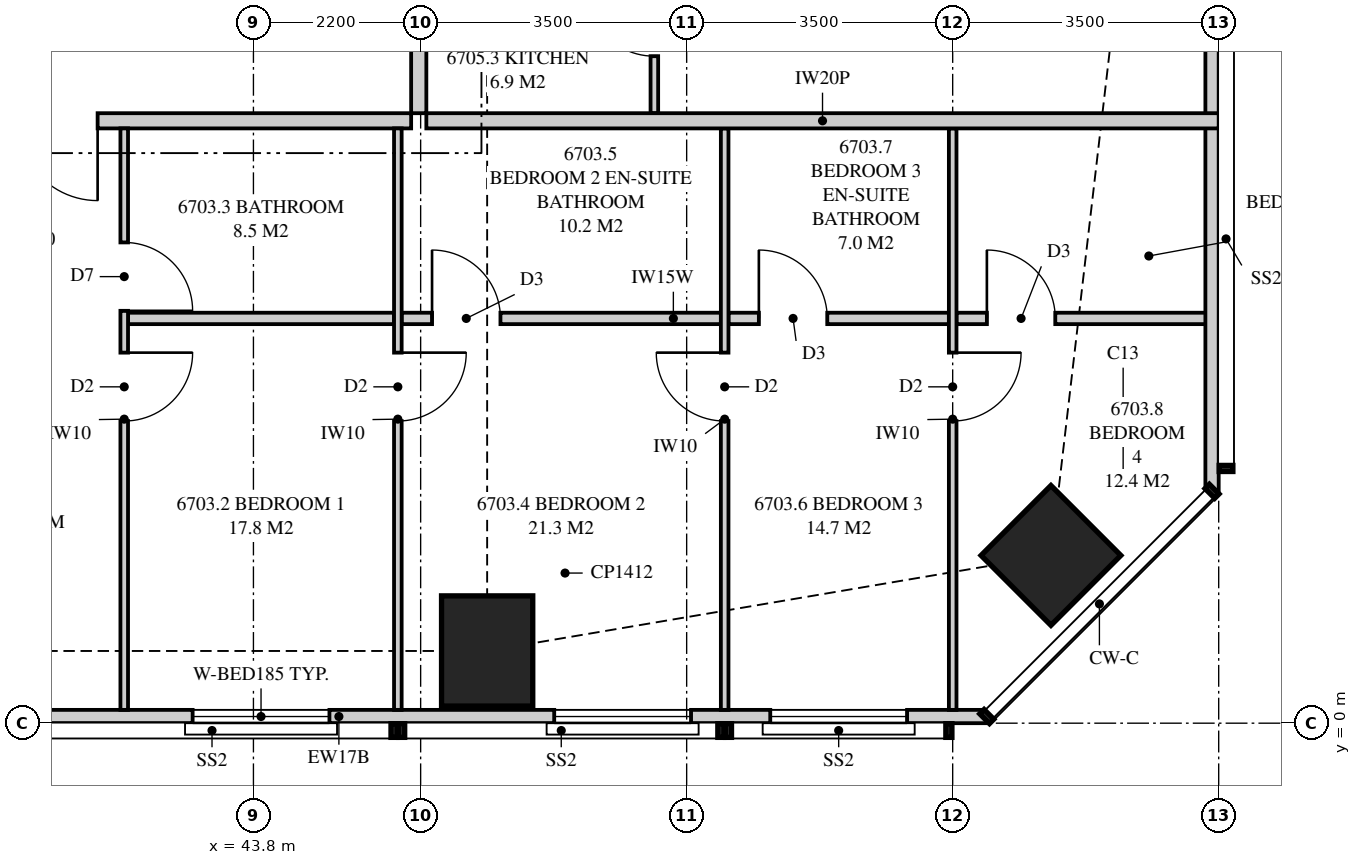
"""IFC4 building model, lengths in metres.
Left out: names, types, materials, properties, quantities, classifications, styles, units other than length and angle.
Written with IfcOpenShell. Run it as: python <this file> out.ifc"""

import sys

from ifc_helpers import new_model, si_unit, direction, frame, frame_2d, origin, origin_2d, place, context, subcontext, project, spatial, polyline, rectangle, outline, extrude, element, fill, save


model = new_model("IFC4")
c1 = context("Model", 3, precision=1e-05, world=origin(), true_north=direction((0.0, 1.0)))
c2 = subcontext(c1, "Body", "Model", "MODEL_VIEW")
j1 = project(units=[si_unit("LENGTHUNIT", "METRE"), si_unit("PLANEANGLEUNIT", "RADIAN")], contexts=[c1])
p1 = place(None, origin())
s1 = spatial("IfcSite", under=j1, at=p1, CompositionType="ELEMENT")
p2 = place(p1, origin())
s2 = spatial("IfcBuilding", under=s1, at=p2, CompositionType="ELEMENT")
p3 = place(p2, frame((0.0, 0.0, 245.95)))
s3 = spatial("IfcBuildingStorey", under=s2, at=p3, CompositionType="ELEMENT", Elevation=245.95)
p4 = place(p3, frame((46.875, 0.95, 0.0), z_axis=(0.0, 0.0, 1.0), x_axis=(0.0, 1.0, 0.0)))
e1 = element("IfcColumn", 1, at=p4, inside=s3, PredefinedType="COLUMN", context=c2, shape_type="SweptSolid", body=[
    extrude(rectangle(XDim=1.45, YDim=1.2, at=origin_2d()), origin(), (0.0, 0.0, 1.0), 3.5),
])
p5 = place(p3, frame((54.293, 2.207, 0.0), z_axis=(0.0, 0.0, 1.0), x_axis=(0.707106781187, 0.707106781187, 0.0)))
e2 = element("IfcColumn", 2, at=p5, inside=s3, PredefinedType="COLUMN", context=c2, shape_type="SweptSolid", body=[
    extrude(rectangle(XDim=1.3, YDim=1.3, at=origin_2d()), origin(), (0.0, 0.0, 1.0), 3.5),
])
p6 = place(p3, frame((36.4, 0.087, 0.0), z_axis=(0.0, 0.0, 1.0), x_axis=(1.0, 0.0, 0.0)))
e3 = element("IfcWall", 3, at=p6, inside=s3, PredefinedType="SOLIDWALL", context=c2, shape_type="SweptSolid", body=[
    extrude(outline(polyline([(0.0, 0.0), (17.049, 0.0), (17.049, 3.26), (10.69, 3.26), (10.69, 2.3), (10.606, 2.3), (10.606, 3.26), (10.475, 3.26), (10.475, 2.3), (0.0, 2.3), (0.0, 0.0)])), frame((0.0, 0.087, 0.0), z_axis=(0.0, -1.0, 0.0), x_axis=(1.0, 0.0, 0.0)), (0.0, 0.0, 1.0), 0.175),
])
p7 = place(p6, frame((1.76, 0.0, 0.4)))
e4 = element("IfcOpeningElement", 4, at=p7, cuts=e3, PredefinedType="OPENING", context=c2, shape_type="SweptSolid", body=[
    extrude(rectangle(XDim=2.4, YDim=1.85, at=frame_2d((1.2, 0.925))), frame((0.0, 0.097, 0.0), z_axis=(0.0, -1.0, 0.0), x_axis=(1.0, 0.0, 0.0)), (0.0, 0.0, 1.0), 0.195),
])
p8 = place(p6, frame((6.6, 0.0, 0.4)))
e5 = element("IfcOpeningElement", 5, at=p8, cuts=e3, PredefinedType="OPENING", context=c2, shape_type="SweptSolid", body=[
    extrude(rectangle(XDim=1.8, YDim=1.85, at=frame_2d((0.9, 0.925))), frame((0.0, 0.097, 0.0), z_axis=(0.0, -1.0, 0.0), x_axis=(1.0, 0.0, 0.0)), (0.0, 0.0, 1.0), 0.195),
])
p9 = place(p6, frame((11.357, 0.0, 0.4)))
e6 = element("IfcOpeningElement", 6, at=p9, cuts=e3, PredefinedType="OPENING", context=c2, shape_type="SweptSolid", body=[
    extrude(rectangle(XDim=1.8, YDim=1.85, at=frame_2d((0.9, 0.925))), frame((0.0, 0.097, 0.0), z_axis=(0.0, -1.0, 0.0), x_axis=(1.0, 0.0, 0.0)), (0.0, 0.0, 1.0), 0.195),
])
p10 = place(p6, frame((14.2, 0.0, 0.4)))
e7 = element("IfcOpeningElement", 7, at=p10, cuts=e3, PredefinedType="OPENING", context=c2, shape_type="SweptSolid", body=[
    extrude(rectangle(XDim=1.8, YDim=1.85, at=frame_2d((0.9, 0.925))), frame((0.0, 0.097, 0.0), z_axis=(0.0, -1.0, 0.0), x_axis=(1.0, 0.0, 0.0)), (0.0, 0.0, 1.0), 0.195),
])
p11 = place(p3, frame((56.413, 3.051, 0.0), z_axis=(0.0, 0.0, 1.0), x_axis=(0.0, 1.0, 0.0)))
e8 = element("IfcWall", 8, at=p11, inside=s3, PredefinedType="SOLIDWALL", context=c2, shape_type="SweptSolid", body=[
    extrude(outline(polyline([(0.0, 0.0), (14.749, 0.0), (14.749, 2.3), (9.949, 2.3), (9.949, 3.26), (9.858, 3.26), (9.858, 2.3), (9.688, 2.3), (9.688, 3.26), (0.0, 3.26), (0.0, 0.0)])), frame((0.0, 0.087, 0.0), z_axis=(0.0, -1.0, 0.0), x_axis=(1.0, 0.0, 0.0)), (0.0, 0.0, 1.0), 0.175),
])
p12 = place(p11, frame((6.64, 0.0, 0.4)))
e9 = element("IfcOpeningElement", 9, at=p12, cuts=e8, PredefinedType="OPENING", context=c2, shape_type="SweptSolid", body=[
    extrude(rectangle(XDim=2.4, YDim=1.85, at=frame_2d((1.2, 0.925))), frame((0.0, 0.097, 0.0), z_axis=(0.0, -1.0, 0.0), x_axis=(1.0, 0.0, 0.0)), (0.0, 0.0, 1.0), 0.195),
])
p13 = place(p11, frame((11.999, 0.0, 0.4)))
e10 = element("IfcOpeningElement", 10, at=p13, cuts=e8, PredefinedType="OPENING", context=c2, shape_type="SweptSolid", body=[
    extrude(rectangle(XDim=1.8, YDim=1.85, at=frame_2d((0.9, 0.925))), frame((0.0, 0.097, 0.0), z_axis=(0.0, -1.0, 0.0), x_axis=(1.0, 0.0, 0.0)), (0.0, 0.0, 1.0), 0.195),
])
p14 = place(p3, frame((36.55, 7.925, 0.0), z_axis=(0.0, 0.0, 1.0), x_axis=(1.0, 0.0, 0.0)))
e11 = element("IfcWall", 11, at=p14, inside=s3, PredefinedType="PARTITIONING", context=c2, shape_type="SweptSolid", body=[
    extrude(outline(polyline([(0.0, 0.0), (9.325, 0.0), (9.325, 3.26), (9.325, 2.66), (9.015, 2.66), (9.015, 3.26), (2.01, 3.26), (2.01, 2.66), (0.0, 2.66), (0.0, 3.26), (0.0, 0.0)])), frame((0.0, 0.1, 0.0), z_axis=(0.0, -1.0, 0.0), x_axis=(1.0, 0.0, 0.0)), (0.0, 0.0, 1.0), 0.2),
])
p15 = place(p14, frame((4.15, 0.0, 0.0)))
e12 = element("IfcOpeningElement", 12, at=p15, cuts=e11, PredefinedType="OPENING", context=c2, shape_type="SweptSolid", body=[
    extrude(rectangle(XDim=1.05, YDim=2.2, at=frame_2d((0.525, 1.1))), frame((0.0, 0.11, 0.0), z_axis=(0.0, -1.0, 0.0), x_axis=(1.0, 0.0, 0.0)), (0.0, 0.0, 1.0), 0.22),
])
p16 = place(p3, frame((42.1, 0.175, 0.0), z_axis=(0.0, 0.0, 1.0), x_axis=(0.0, 1.0, 0.0)))
e13 = element("IfcWall", 13, at=p16, inside=s3, PredefinedType="PARTITIONING", context=c2, shape_type="SweptSolid", body=[
    extrude(outline(polyline([(0.0, 0.0), (7.65, 0.0), (7.65, 3.26), (1.635, 3.26), (1.635, 2.3), (0.0, 2.3), (0.0, 3.26), (0.0, 0.0)])), frame((0.0, 0.05, 0.0), z_axis=(0.0, -1.0, 0.0), x_axis=(1.0, 0.0, 0.0)), (0.0, 0.0, 1.0), 0.1),
])
p17 = place(p16, frame((3.8, 0.0, 0.0)))
e14 = element("IfcOpeningElement", 14, at=p17, cuts=e13, PredefinedType="OPENING", context=c2, shape_type="SweptSolid", body=[
    extrude(rectangle(XDim=0.9, YDim=2.1, at=frame_2d((0.45, 1.05))), frame((0.0, 0.06, 0.0), z_axis=(0.0, -1.0, 0.0), x_axis=(1.0, 0.0, 0.0)), (0.0, 0.0, 1.0), 0.12),
])
p18 = place(p16, frame((5.25, 0.0, 0.0)))
e15 = element("IfcOpeningElement", 15, at=p18, cuts=e13, PredefinedType="OPENING", context=c2, shape_type="SweptSolid", body=[
    extrude(rectangle(XDim=0.9, YDim=2.1, at=frame_2d((0.45, 1.05))), frame((0.0, 0.06, 0.0), z_axis=(0.0, -1.0, 0.0), x_axis=(1.0, 0.0, 0.0)), (0.0, 0.0, 1.0), 0.12),
])
p19 = place(p3, frame((45.7, 0.175, 0.0), z_axis=(0.0, 0.0, 1.0), x_axis=(0.0, 1.0, 0.0)))
e16 = element("IfcWall", 16, at=p19, inside=s3, PredefinedType="PARTITIONING", context=c2, shape_type="SweptSolid", body=[
    extrude(outline(polyline([(0.0, 0.0), (7.65, 0.0), (7.65, 3.26), (7.65, 2.66), (1.635, 2.66), (1.635, 2.3), (0.0, 2.3), (0.0, 3.26), (0.0, 0.0)])), frame((0.0, 0.05, 0.0), z_axis=(0.0, -1.0, 0.0), x_axis=(1.0, 0.0, 0.0)), (0.0, 0.0, 1.0), 0.1),
])
p20 = place(p19, frame((3.8, 0.0, 0.0)))
e17 = element("IfcOpeningElement", 17, at=p20, cuts=e16, PredefinedType="OPENING", context=c2, shape_type="SweptSolid", body=[
    extrude(rectangle(XDim=0.9, YDim=2.1, at=frame_2d((0.45, 1.05))), frame((0.0, 0.06, 0.0), z_axis=(0.0, -1.0, 0.0), x_axis=(1.0, 0.0, 0.0)), (0.0, 0.0, 1.0), 0.12),
])
p21 = place(p3, frame((50.0, 0.175, 0.0), z_axis=(0.0, 0.0, 1.0), x_axis=(0.0, 1.0, 0.0)))
e18 = element("IfcWall", 18, at=p21, inside=s3, PredefinedType="PARTITIONING", context=c2, shape_type="SweptSolid", body=[
    extrude(outline(polyline([(0.0, 0.0), (7.65, 0.0), (7.65, 3.26), (2.177, 3.26), (2.177, 2.3), (0.432, 2.3), (0.432, 3.26), (0.0, 3.26), (0.0, 0.0)])), frame((0.0, 0.05, 0.0), z_axis=(0.0, -1.0, 0.0), x_axis=(1.0, 0.0, 0.0)), (0.0, 0.0, 1.0), 0.1),
])
p22 = place(p21, frame((3.8, 0.0, 0.0)))
e19 = element("IfcOpeningElement", 19, at=p22, cuts=e18, PredefinedType="OPENING", context=c2, shape_type="SweptSolid", body=[
    extrude(rectangle(XDim=0.9, YDim=2.1, at=frame_2d((0.45, 1.05))), frame((0.0, 0.06, 0.0), z_axis=(0.0, -1.0, 0.0), x_axis=(1.0, 0.0, 0.0)), (0.0, 0.0, 1.0), 0.12),
])
p23 = place(p3, frame((53.0, 0.175, 0.0), z_axis=(0.0, 0.0, 1.0), x_axis=(0.0, 1.0, 0.0)))
e20 = element("IfcWall", 20, at=p23, inside=s3, PredefinedType="PARTITIONING", context=c2, shape_type="SweptSolid", body=[
    extrude(outline(polyline([(0.0, 0.0), (7.65, 0.0), (7.65, 3.26), (2.685, 3.26), (2.685, 2.3), (0.941, 2.3), (0.941, 3.26), (0.0, 3.26), (0.0, 0.0)])), frame((0.0, 0.05, 0.0), z_axis=(0.0, -1.0, 0.0), x_axis=(1.0, 0.0, 0.0)), (0.0, 0.0, 1.0), 0.1),
])
p24 = place(p23, frame((3.8, 0.0, 0.0)))
e21 = element("IfcOpeningElement", 21, at=p24, cuts=e20, PredefinedType="OPENING", context=c2, shape_type="SweptSolid", body=[
    extrude(rectangle(XDim=0.9, YDim=2.1, at=frame_2d((0.45, 1.05))), frame((0.0, 0.06, 0.0), z_axis=(0.0, -1.0, 0.0), x_axis=(1.0, 0.0, 0.0)), (0.0, 0.0, 1.0), 0.12),
])
p25 = place(p3, frame((42.15, 5.325, 0.0), z_axis=(0.0, 0.0, 1.0), x_axis=(1.0, 0.0, 0.0)))
e22 = element("IfcWall", 22, at=p25, inside=s3, PredefinedType="PLUMBINGWALL", context=c2, shape_type="SweptSolid", body=[
    extrude(outline(polyline([(0.0, 0.0), (3.5, 0.0), (3.5, 3.26), (3.5, 2.66), (3.44, 2.66), (3.44, 3.26), (0.0, 3.26), (0.0, 0.0)])), frame((0.0, 0.075, 0.0), z_axis=(0.0, -1.0, 0.0), x_axis=(1.0, 0.0, 0.0)), (0.0, 0.0, 1.0), 0.15),
])
p26 = place(p3, frame((45.75, 5.325, 0.0), z_axis=(0.0, 0.0, 1.0), x_axis=(1.0, 0.0, 0.0)))
e23 = element("IfcWall", 23, at=p26, inside=s3, PredefinedType="PLUMBINGWALL", context=c2, shape_type="SweptSolid", body=[
    extrude(outline(polyline([(0.0, 0.0), (4.2, 0.0), (4.2, 3.26), (2.41, 3.26), (2.41, 2.66), (0.0, 2.66), (0.0, 3.26), (0.0, 0.0)])), frame((0.0, 0.075, 0.0), z_axis=(0.0, -1.0, 0.0), x_axis=(1.0, 0.0, 0.0)), (0.0, 0.0, 1.0), 0.15),
])
p27 = place(p26, frame((0.4, 0.0, 0.0)))
e24 = element("IfcOpeningElement", 24, at=p27, cuts=e23, PredefinedType="OPENING", context=c2, shape_type="SweptSolid", body=[
    extrude(rectangle(XDim=0.9, YDim=2.1, at=frame_2d((0.45, 1.05))), frame((0.0, 0.085, 0.0), z_axis=(0.0, -1.0, 0.0), x_axis=(1.0, 0.0, 0.0)), (0.0, 0.0, 1.0), 0.17),
])
p28 = place(p3, frame((50.05, 5.325, 0.0), z_axis=(0.0, 0.0, 1.0), x_axis=(1.0, 0.0, 0.0)))
e25 = element("IfcWall", 25, at=p28, inside=s3, PredefinedType="PLUMBINGWALL", context=c2, shape_type="SweptSolid", body=[
    extrude(rectangle(XDim=2.9, YDim=0.15, at=frame_2d((1.45, 0.0))), origin(), (0.0, 0.0, 1.0), 3.26),
])
p29 = place(p28, frame((0.4, 0.0, 0.0)))
e26 = element("IfcOpeningElement", 26, at=p29, cuts=e25, PredefinedType="OPENING", context=c2, shape_type="SweptSolid", body=[
    extrude(rectangle(XDim=0.9, YDim=2.1, at=frame_2d((0.45, 1.05))), frame((0.0, 0.085, 0.0), z_axis=(0.0, -1.0, 0.0), x_axis=(1.0, 0.0, 0.0)), (0.0, 0.0, 1.0), 0.17),
])
p30 = place(p3, frame((53.05, 5.325, 0.0), z_axis=(0.0, 0.0, 1.0), x_axis=(1.0, 0.0, 0.0)))
e27 = element("IfcWall", 27, at=p30, inside=s3, PredefinedType="PLUMBINGWALL", context=c2, shape_type="SweptSolid", body=[
    extrude(outline(polyline([(0.0, 0.0), (3.45, 0.0), (3.45, 3.26), (2.497, 3.26), (2.497, 2.3), (0.715, 2.3), (0.715, 3.26), (0.0, 3.26), (0.0, 0.0)])), frame((0.0, 0.075, 0.0), z_axis=(0.0, -1.0, 0.0), x_axis=(1.0, 0.0, 0.0)), (0.0, 0.0, 1.0), 0.15),
])
p31 = place(p30, frame((0.4, 0.0, 0.0)))
e28 = element("IfcOpeningElement", 28, at=p31, cuts=e27, PredefinedType="OPENING", context=c2, shape_type="SweptSolid", body=[
    extrude(rectangle(XDim=0.9, YDim=2.1, at=frame_2d((0.45, 1.05))), frame((0.0, 0.085, 0.0), z_axis=(0.0, -1.0, 0.0), x_axis=(1.0, 0.0, 0.0)), (0.0, 0.0, 1.0), 0.17),
])
p32 = place(p3, frame((46.075, 7.925, 0.0), z_axis=(0.0, 0.0, 1.0), x_axis=(1.0, 0.0, 0.0)))
e29 = element("IfcWall", 29, at=p32, inside=s3, PredefinedType="PARTITIONING", context=c2, shape_type="SweptSolid", body=[
    extrude(outline(polyline([(0.0, 0.0), (10.425, 0.0), (10.425, 3.26), (9.8, 3.26), (9.8, 2.3), (7.968, 2.3), (7.968, 3.26), (2.11, 3.26), (2.11, 2.66), (0.0, 2.66), (0.0, 3.26), (0.0, 0.0)])), frame((0.0, 0.1, 0.0), z_axis=(0.0, -1.0, 0.0), x_axis=(1.0, 0.0, 0.0)), (0.0, 0.0, 1.0), 0.2),
])
p33 = place(p3, frame((45.975, 8.025, 0.0), z_axis=(0.0, 0.0, 1.0), x_axis=(0.0, 1.0, 0.0)))
e30 = element("IfcWall", 30, at=p33, inside=s3, PredefinedType="PARTITIONING", context=c2, shape_type="SweptSolid", body=[
    extrude(outline(polyline([(0.0, 0.0), (6.025, 0.0), (6.025, 3.26), (6.025, 2.66), (5.085, 2.66), (0.0, 2.66), (0.0, 3.26), (0.0, 0.0)])), frame((0.0, 0.1, 0.0), z_axis=(0.0, -1.0, 0.0), x_axis=(1.0, 0.0, 0.0)), (0.0, 0.0, 1.0), 0.2),
])
p34 = place(p33, frame((2.512, 0.0, 0.0)))
e31 = element("IfcOpeningElement", 31, at=p34, cuts=e30, PredefinedType="OPENING", context=c2, shape_type="SweptSolid", body=[
    extrude(rectangle(XDim=1.05, YDim=2.2, at=frame_2d((0.525, 1.1))), frame((0.0, 0.11, 0.0), z_axis=(0.0, -1.0, 0.0), x_axis=(1.0, 0.0, 0.0)), (0.0, 0.0, 1.0), 0.22),
])
p35 = place(p3, frame((49.075, 8.025, 0.0), z_axis=(0.0, 0.0, 1.0), x_axis=(0.0, 1.0, 0.0)))
e32 = element("IfcWall", 32, at=p35, inside=s3, PredefinedType="PARTITIONING", context=c2, shape_type="SweptSolid", body=[
    extrude(rectangle(XDim=2.35, YDim=0.1, at=frame_2d((1.175, 0.0))), origin(), (0.0, 0.0, 1.0), 3.26),
])
p36 = place(p35, frame((0.75, 0.0, 0.0)))
e33 = element("IfcOpeningElement", 33, at=p36, cuts=e32, PredefinedType="OPENING", context=c2, shape_type="SweptSolid", body=[
    extrude(rectangle(XDim=0.9, YDim=2.1, at=frame_2d((0.45, 1.05))), frame((0.0, 0.06, 0.0), z_axis=(0.0, -1.0, 0.0), x_axis=(1.0, 0.0, 0.0)), (0.0, 0.0, 1.0), 0.12),
])
p37 = place(p8, origin())
e34 = element("IfcWindow", 34, at=p37, inside=s3, PartitioningType="SINGLE_PANEL", PredefinedType="WINDOW", context=c2, shape_type="SweptSolid", body=[
    extrude(rectangle(XDim=1.8, YDim=1.85, at=frame_2d((0.9, 0.925))), frame((0.0, 0.03, 0.0), z_axis=(0.0, -1.0, 0.0), x_axis=(1.0, 0.0, 0.0)), (0.0, 0.0, 1.0), 0.06),
])
fill(e5, e34)
p38 = place(p9, origin())
e35 = element("IfcWindow", 35, at=p38, inside=s3, PartitioningType="SINGLE_PANEL", PredefinedType="WINDOW", context=c2, shape_type="SweptSolid", body=[
    extrude(rectangle(XDim=1.8, YDim=1.85, at=frame_2d((0.9, 0.925))), frame((0.0, 0.03, 0.0), z_axis=(0.0, -1.0, 0.0), x_axis=(1.0, 0.0, 0.0)), (0.0, 0.0, 1.0), 0.06),
])
fill(e6, e35)
p39 = place(p10, origin())
e36 = element("IfcWindow", 36, at=p39, inside=s3, PartitioningType="SINGLE_PANEL", PredefinedType="WINDOW", context=c2, shape_type="SweptSolid", body=[
    extrude(rectangle(XDim=1.8, YDim=1.85, at=frame_2d((0.9, 0.925))), frame((0.0, 0.03, 0.0), z_axis=(0.0, -1.0, 0.0), x_axis=(1.0, 0.0, 0.0)), (0.0, 0.0, 1.0), 0.06),
])
fill(e7, e36)
p40 = place(p15, frame((1.05, 0.0, 0.0), z_axis=(0.0, 0.0, 1.0), x_axis=(-1.0, 0.0, 0.0)))
e37 = element("IfcDoor", 37, at=p40, inside=s3, OperationType="SINGLE_SWING_LEFT", PredefinedType="DOOR", context=c2, shape_type="SweptSolid", body=[
    extrude(rectangle(XDim=1.05, YDim=2.2, at=frame_2d((0.525, 1.1))), frame((0.0, 0.025, 0.0), z_axis=(0.0, -1.0, 0.0), x_axis=(1.0, 0.0, 0.0)), (0.0, 0.0, 1.0), 0.05),
])
fill(e12, e37)
p41 = place(p17, frame((0.9, 0.0, 0.0), z_axis=(0.0, 0.0, 1.0), x_axis=(-1.0, 0.0, 0.0)))
e38 = element("IfcDoor", 38, at=p41, inside=s3, OperationType="SINGLE_SWING_LEFT", PredefinedType="DOOR", context=c2, shape_type="SweptSolid", body=[
    extrude(rectangle(XDim=0.9, YDim=2.1, at=frame_2d((0.45, 1.05))), frame((0.0, 0.025, 0.0), z_axis=(0.0, -1.0, 0.0), x_axis=(1.0, 0.0, 0.0)), (0.0, 0.0, 1.0), 0.05),
])
fill(e14, e38)
p42 = place(p18, frame((0.9, 0.0, 0.0), z_axis=(0.0, 0.0, 1.0), x_axis=(-1.0, 0.0, 0.0)))
e39 = element("IfcDoor", 39, at=p42, inside=s3, OperationType="SINGLE_SWING_RIGHT", PredefinedType="DOOR", context=c2, shape_type="SweptSolid", body=[
    extrude(rectangle(XDim=0.9, YDim=2.1, at=frame_2d((0.45, 1.05))), frame((0.0, 0.025, 0.0), z_axis=(0.0, -1.0, 0.0), x_axis=(1.0, 0.0, 0.0)), (0.0, 0.0, 1.0), 0.05),
])
fill(e15, e39)
p43 = place(p20, frame((0.9, 0.0, 0.0), z_axis=(0.0, 0.0, 1.0), x_axis=(-1.0, 0.0, 0.0)))
e40 = element("IfcDoor", 40, at=p43, inside=s3, OperationType="SINGLE_SWING_LEFT", PredefinedType="DOOR", context=c2, shape_type="SweptSolid", body=[
    extrude(rectangle(XDim=0.9, YDim=2.1, at=frame_2d((0.45, 1.05))), frame((0.0, 0.025, 0.0), z_axis=(0.0, -1.0, 0.0), x_axis=(1.0, 0.0, 0.0)), (0.0, 0.0, 1.0), 0.05),
])
fill(e17, e40)
p44 = place(p27, origin())
e41 = element("IfcDoor", 41, at=p44, inside=s3, OperationType="SINGLE_SWING_LEFT", PredefinedType="DOOR", context=c2, shape_type="SweptSolid", body=[
    extrude(rectangle(XDim=0.9, YDim=2.1, at=frame_2d((0.45, 1.05))), frame((0.0, 0.025, 0.0), z_axis=(0.0, -1.0, 0.0), x_axis=(1.0, 0.0, 0.0)), (0.0, 0.0, 1.0), 0.05),
])
fill(e24, e41)
p45 = place(p22, origin())
e42 = element("IfcDoor", 42, at=p45, inside=s3, OperationType="SINGLE_SWING_RIGHT", PredefinedType="DOOR", context=c2, shape_type="SweptSolid", body=[
    extrude(rectangle(XDim=0.9, YDim=2.1, at=frame_2d((0.45, 1.05))), frame((0.0, 0.025, 0.0), z_axis=(0.0, -1.0, 0.0), x_axis=(1.0, 0.0, 0.0)), (0.0, 0.0, 1.0), 0.05),
])
fill(e19, e42)
p46 = place(p29, origin())
e43 = element("IfcDoor", 43, at=p46, inside=s3, OperationType="SINGLE_SWING_LEFT", PredefinedType="DOOR", context=c2, shape_type="SweptSolid", body=[
    extrude(rectangle(XDim=0.9, YDim=2.1, at=frame_2d((0.45, 1.05))), frame((0.0, 0.025, 0.0), z_axis=(0.0, -1.0, 0.0), x_axis=(1.0, 0.0, 0.0)), (0.0, 0.0, 1.0), 0.05),
])
fill(e26, e43)
p47 = place(p24, frame((0.9, 0.0, 0.0), z_axis=(0.0, 0.0, 1.0), x_axis=(-1.0, 0.0, 0.0)))
e44 = element("IfcDoor", 44, at=p47, inside=s3, OperationType="SINGLE_SWING_LEFT", PredefinedType="DOOR", context=c2, shape_type="SweptSolid", body=[
    extrude(rectangle(XDim=0.9, YDim=2.1, at=frame_2d((0.45, 1.05))), frame((0.0, 0.025, 0.0), z_axis=(0.0, -1.0, 0.0), x_axis=(1.0, 0.0, 0.0)), (0.0, 0.0, 1.0), 0.05),
])
fill(e21, e44)
p48 = place(p31, origin())
e45 = element("IfcDoor", 45, at=p48, inside=s3, OperationType="SINGLE_SWING_LEFT", PredefinedType="DOOR", context=c2, shape_type="SweptSolid", body=[
    extrude(rectangle(XDim=0.9, YDim=2.1, at=frame_2d((0.45, 1.05))), frame((0.0, 0.025, 0.0), z_axis=(0.0, -1.0, 0.0), x_axis=(1.0, 0.0, 0.0)), (0.0, 0.0, 1.0), 0.05),
])
fill(e28, e45)
p49 = place(p36, origin())
e46 = element("IfcDoor", 46, at=p49, inside=s3, OperationType="SINGLE_SWING_RIGHT", PredefinedType="DOOR", context=c2, shape_type="SweptSolid", body=[
    extrude(rectangle(XDim=0.9, YDim=2.1, at=frame_2d((0.45, 1.05))), frame((0.0, 0.025, 0.0), z_axis=(0.0, -1.0, 0.0), x_axis=(1.0, 0.0, 0.0)), (0.0, 0.0, 1.0), 0.05),
])
fill(e33, e46)
save(model, sys.argv[1])
